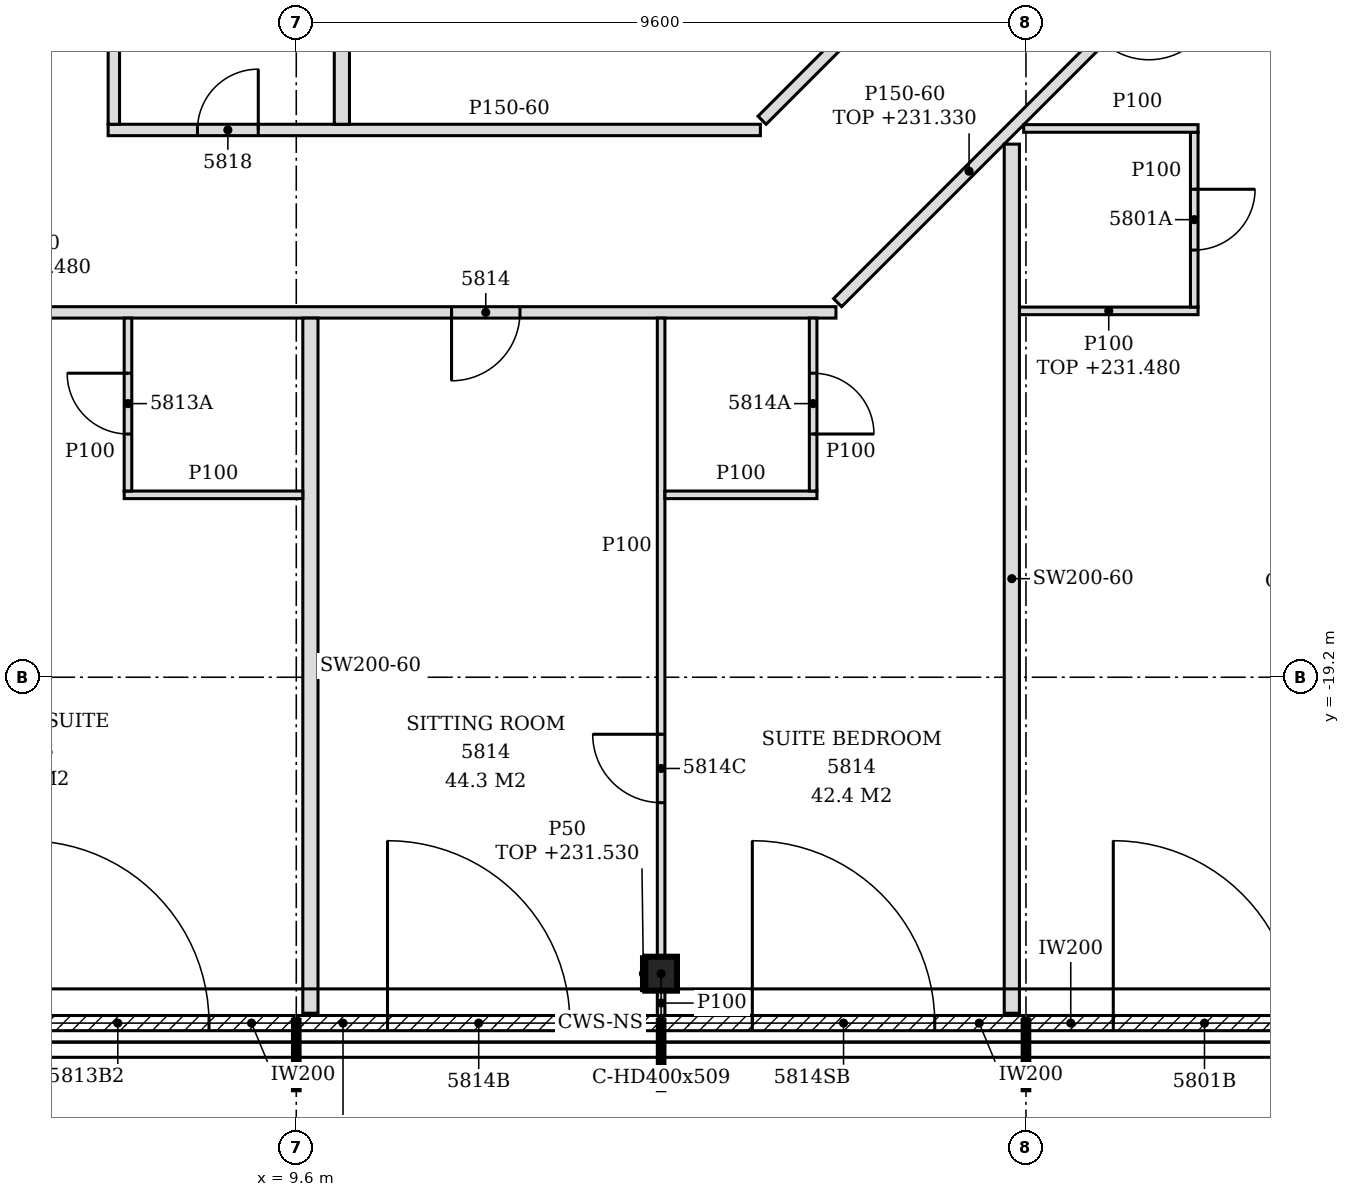
"""IFC4 building model, lengths in metres.
Left out: names, types, materials, properties, quantities, classifications, styles, units other than length and angle.
Written with IfcOpenShell. Run it as: python <this file> out.ifc"""

import sys

from ifc_helpers import new_model, si_unit, direction, frame, frame_2d, origin, origin_2d, place, context, subcontext, project, spatial, polyline, rectangle, i_section, outline, extrude, element, fill, save


model = new_model("IFC4")
c1 = context("Model", 3, precision=1e-05, world=origin(), true_north=direction((0.0, 1.0)))
c2 = subcontext(c1, "Body", "Model", "MODEL_VIEW")
j1 = project(units=[si_unit("LENGTHUNIT", "METRE"), si_unit("PLANEANGLEUNIT", "RADIAN")], contexts=[c1])
p1 = place(None, origin())
s1 = spatial("IfcSite", under=j1, at=p1, CompositionType="ELEMENT")
p2 = place(p1, origin())
s2 = spatial("IfcBuilding", under=s1, at=p2, CompositionType="ELEMENT")
p3 = place(p2, frame((0.0, 0.0, 228.6)))
s3 = spatial("IfcBuildingStorey", under=s2, at=p3, CompositionType="ELEMENT", Elevation=228.6)
p4 = place(p3, frame((14.4, -23.1, -0.15), z_axis=(0.0, 0.0, 1.0), x_axis=(1.0, 0.0, 0.0)))
e1 = element("IfcColumn", 1, at=p4, inside=s3, PredefinedType="COLUMN", context=c2, shape_type="SweptSolid", body=[
    extrude(i_section(OverallWidth=0.416, OverallDepth=0.446, WebThickness=0.039, FlangeThickness=0.063, FilletRadius=0.015, at=origin_2d()), origin(), (0.0, 0.0, 1.0), 3.6),
])
p5 = place(p3, frame((4.944, -23.75, 0.0), z_axis=(0.0, 0.0, 1.0), x_axis=(1.0, 0.0, 0.0)))
e2 = element("IfcWall", 2, at=p5, inside=s3, PredefinedType="NOTDEFINED", context=c2, shape_type="SweptSolid", body=[
    extrude(rectangle(XDim=4.626, YDim=0.2, at=frame_2d((2.313, 0.0))), origin(), (0.0, 0.0, 1.0), 3.45),
])
p6 = place(p5, frame((1.108, 0.0, 0.0)))
e3 = element("IfcOpeningElement", 3, at=p6, cuts=e2, PredefinedType="OPENING", context=c2, shape_type="SweptSolid", body=[
    extrude(rectangle(XDim=2.4, YDim=2.4, at=frame_2d((1.2, 1.2))), frame((0.0, 0.11, 0.0), z_axis=(0.0, -1.0, 0.0), x_axis=(1.0, 0.0, 0.0)), (0.0, 0.0, 1.0), 0.22),
])
p7 = place(p3, frame((9.63, -23.75, 0.0), z_axis=(0.0, 0.0, 1.0), x_axis=(1.0, 0.0, 0.0)))
e4 = element("IfcWall", 4, at=p7, inside=s3, PredefinedType="NOTDEFINED", context=c2, shape_type="SweptSolid", body=[
    extrude(rectangle(XDim=4.74, YDim=0.2, at=frame_2d((2.37, 0.0))), origin(), (0.0, 0.0, 1.0), 3.45),
])
p8 = place(p7, frame((1.17, 0.0, 0.0)))
e5 = element("IfcOpeningElement", 5, at=p8, cuts=e4, PredefinedType="OPENING", context=c2, shape_type="SweptSolid", body=[
    extrude(rectangle(XDim=2.4, YDim=2.4, at=frame_2d((1.2, 1.2))), frame((0.0, 0.11, 0.0), z_axis=(0.0, -1.0, 0.0), x_axis=(1.0, 0.0, 0.0)), (0.0, 0.0, 1.0), 0.22),
])
p9 = place(p3, frame((14.43, -23.75, 0.0), z_axis=(0.0, 0.0, 1.0), x_axis=(1.0, 0.0, 0.0)))
e6 = element("IfcWall", 6, at=p9, inside=s3, PredefinedType="NOTDEFINED", context=c2, shape_type="SweptSolid", body=[
    extrude(rectangle(XDim=4.74, YDim=0.2, at=frame_2d((2.37, 0.0))), origin(), (0.0, 0.0, 1.0), 3.45),
])
p10 = place(p9, frame((1.17, 0.0, 0.0)))
e7 = element("IfcOpeningElement", 7, at=p10, cuts=e6, PredefinedType="OPENING", context=c2, shape_type="SweptSolid", body=[
    extrude(rectangle(XDim=2.4, YDim=2.4, at=frame_2d((1.2, 1.2))), frame((0.0, 0.11, 0.0), z_axis=(0.0, -1.0, 0.0), x_axis=(1.0, 0.0, 0.0)), (0.0, 0.0, 1.0), 0.22),
])
p11 = place(p3, frame((19.23, -23.75, 0.0), z_axis=(0.0, 0.0, 1.0), x_axis=(1.0, 0.0, 0.0)))
e8 = element("IfcWall", 8, at=p11, inside=s3, PredefinedType="NOTDEFINED", context=c2, shape_type="SweptSolid", body=[
    extrude(rectangle(XDim=4.626, YDim=0.2, at=frame_2d((2.313, 0.0))), origin(), (0.0, 0.0, 1.0), 3.45),
])
p12 = place(p11, frame((1.119, 0.0, 0.0)))
e9 = element("IfcOpeningElement", 9, at=p12, cuts=e8, PredefinedType="OPENING", context=c2, shape_type="SweptSolid", body=[
    extrude(rectangle(XDim=2.4, YDim=2.4, at=frame_2d((1.2, 1.2))), frame((0.0, 0.11, 0.0), z_axis=(0.0, -1.0, 0.0), x_axis=(1.0, 0.0, 0.0)), (0.0, 0.0, 1.0), 0.22),
])
p13 = place(p3, frame((14.4, -23.65, 0.0), z_axis=(0.0, 0.0, 1.0), x_axis=(0.0, 1.0, 0.0)))
e10 = element("IfcWall", 10, at=p13, inside=s3, PredefinedType="PARTITIONING", context=c2, shape_type="SweptSolid", body=[
    extrude(rectangle(XDim=0.327, YDim=0.1, at=frame_2d((0.164, 0.0))), origin(), (0.0, 0.0, 1.0), 3.45),
])
p14 = place(p3, frame((9.786, -23.62, 0.0), z_axis=(0.0, 0.0, 1.0), x_axis=(0.0, 1.0, 0.0)))
e11 = element("IfcWall", 11, at=p14, inside=s3, PredefinedType="PARTITIONING", context=c2, shape_type="SweptSolid", body=[
    extrude(outline(polyline([(0.0, 0.0), (9.145, 0.0), (9.145, 2.88), (9.115, 2.88), (9.113, 3.45), (4.525, 3.45), (4.523, 2.88), (4.315, 2.88), (4.313, 3.45), (0.67, 3.45), (0.668, 2.93), (0.37, 2.93), (0.368, 3.45), (0.0, 3.45), (0.0, 0.0)])), frame((0.0, 0.1, 0.0), z_axis=(0.0, -1.0, 0.0), x_axis=(1.0, 0.0, 0.0)), (0.0, 0.0, 1.0), 0.2),
])
p15 = place(p3, frame((19.014, -23.62, 0.0), z_axis=(0.0, 0.0, 1.0), x_axis=(0.0, 1.0, 0.0)))
e12 = element("IfcWall", 12, at=p15, inside=s3, PredefinedType="PARTITIONING", context=c2, shape_type="SweptSolid", body=[
    extrude(outline(polyline([(0.0, 0.0), (11.434, 0.0), (11.434, 2.73), (0.64, 2.73), (0.638, 2.93), (0.37, 2.93), (0.368, 3.45), (0.0, 3.45), (0.0, 0.0)])), frame((0.0, 0.1, 0.0), z_axis=(0.0, -1.0, 0.0), x_axis=(1.0, 0.0, 0.0)), (0.0, 0.0, 1.0), 0.2),
])
p16 = place(p3, frame((14.4, -22.877, 0.0), z_axis=(0.0, 0.0, 1.0), x_axis=(0.0, 1.0, 0.0)))
e13 = element("IfcWall", 13, at=p16, inside=s3, PredefinedType="PARTITIONING", context=c2, shape_type="SweptSolid", body=[
    extrude(outline(polyline([(0.0, 0.0), (8.402, 0.0), (8.402, 2.88), (8.372, 2.88), (8.37, 3.45), (3.782, 3.45), (3.78, 2.88), (3.572, 2.88), (3.57, 3.45), (0.0, 3.45), (0.0, 0.0)])), frame((0.0, 0.05, 0.0), z_axis=(0.0, -1.0, 0.0), x_axis=(1.0, 0.0, 0.0)), (0.0, 0.0, 1.0), 0.1),
])
p17 = place(p16, frame((2.027, 0.0, 0.0)))
e14 = element("IfcOpeningElement", 14, at=p17, cuts=e13, PredefinedType="OPENING", context=c2, shape_type="SweptSolid", body=[
    extrude(rectangle(XDim=0.9, YDim=2.1, at=frame_2d((0.45, 1.05))), frame((0.0, 0.06, 0.0), z_axis=(0.0, -1.0, 0.0), x_axis=(1.0, 0.0, 0.0)), (0.0, 0.0, 1.0), 0.12),
])
p18 = place(p3, frame((7.336, -16.8, 0.0), z_axis=(0.0, 0.0, 1.0), x_axis=(1.0, 0.0, 0.0)))
e15 = element("IfcWall", 15, at=p18, inside=s3, PredefinedType="PARTITIONING", context=c2, shape_type="SweptSolid", body=[
    extrude(outline(polyline([(0.0, 0.0), (2.35, 0.0), (2.35, 3.45), (0.014, 3.45), (0.012, 2.73), (0.0, 2.73), (0.0, 0.0)])), frame((0.0, 0.05, 0.0), z_axis=(0.0, -1.0, 0.0), x_axis=(1.0, 0.0, 0.0)), (0.0, 0.0, 1.0), 0.1),
])
p19 = place(p3, frame((7.386, -16.75, 0.0), z_axis=(0.0, 0.0, 1.0), x_axis=(0.0, 1.0, 0.0)))
e16 = element("IfcWall", 16, at=p19, inside=s3, PredefinedType="PARTITIONING", context=c2, shape_type="SweptSolid", body=[
    extrude(outline(polyline([(0.0, 0.0), (2.275, 0.0), (2.275, 2.88), (2.245, 2.88), (2.243, 3.45), (0.0, 3.45), (0.0, 0.0)])), frame((0.0, 0.05, 0.0), z_axis=(0.0, -1.0, 0.0), x_axis=(1.0, 0.0, 0.0)), (0.0, 0.0, 1.0), 0.1),
])
p20 = place(p19, frame((0.75, 0.0, 0.0)))
e17 = element("IfcOpeningElement", 17, at=p20, cuts=e16, PredefinedType="OPENING", context=c2, shape_type="SweptSolid", body=[
    extrude(rectangle(XDim=0.8, YDim=2.1, at=frame_2d((0.4, 1.05))), frame((0.0, 0.06, 0.0), z_axis=(0.0, -1.0, 0.0), x_axis=(1.0, 0.0, 0.0)), (0.0, 0.0, 1.0), 0.12),
])
p21 = place(p3, frame((14.45, -16.8, 0.0), z_axis=(0.0, 0.0, 1.0), x_axis=(1.0, 0.0, 0.0)))
e18 = element("IfcWall", 18, at=p21, inside=s3, PredefinedType="PARTITIONING", context=c2, shape_type="SweptSolid", body=[
    extrude(rectangle(XDim=2.0, YDim=0.1, at=frame_2d((1.0, 0.0))), origin(), (0.0, 0.0, 1.0), 3.45),
])
p22 = place(p3, frame((16.4, -16.75, 0.0), z_axis=(0.0, 0.0, 1.0), x_axis=(0.0, 1.0, 0.0)))
e19 = element("IfcWall", 19, at=p22, inside=s3, PredefinedType="PARTITIONING", context=c2, shape_type="SweptSolid", body=[
    extrude(outline(polyline([(0.0, 0.0), (2.275, 0.0), (2.275, 2.88), (2.245, 2.88), (2.243, 3.45), (0.0, 3.45), (0.0, 0.0)])), frame((0.0, 0.05, 0.0), z_axis=(0.0, -1.0, 0.0), x_axis=(1.0, 0.0, 0.0)), (0.0, 0.0, 1.0), 0.1),
])
p23 = place(p22, frame((0.75, 0.0, 0.0)))
e20 = element("IfcOpeningElement", 20, at=p23, cuts=e19, PredefinedType="OPENING", context=c2, shape_type="SweptSolid", body=[
    extrude(rectangle(XDim=0.8, YDim=2.1, at=frame_2d((0.4, 1.05))), frame((0.0, 0.06, 0.0), z_axis=(0.0, -1.0, 0.0), x_axis=(1.0, 0.0, 0.0)), (0.0, 0.0, 1.0), 0.12),
])
p24 = place(p3, frame((29.636, -16.66, 0.0), z_axis=(0.0, 0.0, 1.0), x_axis=(-0.707095420673, 0.707118141518, 0.0)))
e21 = element("IfcWall", 21, at=p24, inside=s3, PredefinedType="PARTITIONING", context=c2, shape_type="SweptSolid", body=[
    extrude(rectangle(XDim=10.745, YDim=0.2, at=frame_2d((5.373, 0.0))), origin(), (0.0, 0.0, 1.0), 2.88),
])
p25 = place(p3, frame((-4.326, -14.4, 0.0), z_axis=(0.0, 0.0, 1.0), x_axis=(1.0, 0.0, 0.0)))
e22 = element("IfcWall", 22, at=p25, inside=s3, PredefinedType="PARTITIONING", context=c2, shape_type="SweptSolid", body=[
    extrude(outline(polyline([(0.0, 0.0), (21.026, 0.0), (21.026, 2.88), (11.676, 2.88), (11.674, 2.73), (11.376, 2.73), (11.374, 2.88), (1.369, 2.88), (1.367, 2.63), (0.229, 2.63), (0.227, 2.88), (0.0, 2.88), (0.0, 0.0)])), frame((0.0, 0.075, 0.0), z_axis=(0.0, -1.0, 0.0), x_axis=(1.0, 0.0, 0.0)), (0.0, 0.0, 1.0), 0.15),
])
p26 = place(p25, frame((5.169, 0.0, 0.0)))
e23 = element("IfcOpeningElement", 23, at=p26, cuts=e22, PredefinedType="OPENING", context=c2, shape_type="SweptSolid", body=[
    extrude(rectangle(XDim=0.9, YDim=2.1, at=frame_2d((0.45, 1.05))), frame((0.0, 0.085, 0.0), z_axis=(0.0, -1.0, 0.0), x_axis=(1.0, 0.0, 0.0)), (0.0, 0.0, 1.0), 0.17),
])
p27 = place(p25, frame((15.969, 0.0, 0.0)))
e24 = element("IfcOpeningElement", 24, at=p27, cuts=e22, PredefinedType="OPENING", context=c2, shape_type="SweptSolid", body=[
    extrude(rectangle(XDim=0.9, YDim=2.1, at=frame_2d((0.45, 1.05))), frame((0.0, 0.085, 0.0), z_axis=(0.0, -1.0, 0.0), x_axis=(1.0, 0.0, 0.0)), (0.0, 0.0, 1.0), 0.17),
])
p28 = place(p3, frame((19.114, -14.38, 0.0), z_axis=(0.0, 0.0, 1.0), x_axis=(1.0, 0.0, 0.0)))
e25 = element("IfcWall", 25, at=p28, inside=s3, PredefinedType="PARTITIONING", context=c2, shape_type="SweptSolid", body=[
    extrude(outline(polyline([(0.0, 0.0), (2.35, 0.0), (2.35, 2.88), (0.236, 2.88), (0.234, 2.73), (0.0, 2.73), (0.0, 0.0)])), frame((0.0, 0.05, 0.0), z_axis=(0.0, -1.0, 0.0), x_axis=(1.0, 0.0, 0.0)), (0.0, 0.0, 1.0), 0.1),
])
p29 = place(p3, frame((16.722, -14.272, 0.0), z_axis=(0.0, 0.0, 1.0), x_axis=(0.707106781187, 0.707106781187, 0.0)))
e26 = element("IfcWall", 26, at=p29, inside=s3, PredefinedType="PARTITIONING", context=c2, shape_type="SweptSolid", body=[
    extrude(rectangle(XDim=20.049, YDim=0.15, at=frame_2d((10.025, 0.0))), origin(), (0.0, 0.0, 1.0), 2.73),
])
p30 = place(p29, frame((4.892, 0.0, 0.0)))
e27 = element("IfcOpeningElement", 27, at=p30, cuts=e26, PredefinedType="OPENING", context=c2, shape_type="SweptSolid", body=[
    extrude(rectangle(XDim=0.9, YDim=2.1, at=frame_2d((0.45, 1.05))), frame((0.0, 0.085, 0.0), z_axis=(0.0, -1.0, 0.0), x_axis=(1.0, 0.0, 0.0)), (0.0, 0.0, 1.0), 0.17),
])
p31 = place(p29, frame((10.042, 0.0, 0.0)))
e28 = element("IfcOpeningElement", 28, at=p31, cuts=e26, PredefinedType="OPENING", context=c2, shape_type="SweptSolid", body=[
    extrude(rectangle(XDim=0.9, YDim=2.1, at=frame_2d((0.45, 1.05))), frame((0.0, 0.085, 0.0), z_axis=(0.0, -1.0, 0.0), x_axis=(1.0, 0.0, 0.0)), (0.0, 0.0, 1.0), 0.17),
])
p32 = place(p29, frame((14.443, 0.0, 0.0)))
e29 = element("IfcOpeningElement", 29, at=p32, cuts=e26, PredefinedType="OPENING", context=c2, shape_type="SweptSolid", body=[
    extrude(rectangle(XDim=0.9, YDim=2.1, at=frame_2d((0.45, 1.05))), frame((0.0, 0.085, 0.0), z_axis=(0.0, -1.0, 0.0), x_axis=(1.0, 0.0, 0.0)), (0.0, 0.0, 1.0), 0.17),
])
p33 = place(p29, frame((17.837, 0.0, 0.0)))
e30 = element("IfcOpeningElement", 30, at=p33, cuts=e26, PredefinedType="OPENING", context=c2, shape_type="SweptSolid", body=[
    extrude(rectangle(XDim=0.9, YDim=2.1, at=frame_2d((0.45, 1.05))), frame((0.0, 0.085, 0.0), z_axis=(0.0, -1.0, 0.0), x_axis=(1.0, 0.0, 0.0)), (0.0, 0.0, 1.0), 0.17),
])
p34 = place(p3, frame((21.414, -14.33, 0.0), z_axis=(0.0, 0.0, 1.0), x_axis=(0.0, 1.0, 0.0)))
e31 = element("IfcWall", 31, at=p34, inside=s3, PredefinedType="PARTITIONING", context=c2, shape_type="SweptSolid", body=[
    extrude(outline(polyline([(0.0, 0.0), (2.3, 0.0), (2.3, 3.45), (0.035, 3.45), (0.033, 2.88), (0.0, 2.88), (0.0, 0.0)])), frame((0.0, 0.05, 0.0), z_axis=(0.0, -1.0, 0.0), x_axis=(1.0, 0.0, 0.0)), (0.0, 0.0, 1.0), 0.1),
])
p35 = place(p34, frame((0.75, 0.0, 0.0)))
e32 = element("IfcOpeningElement", 32, at=p35, cuts=e31, PredefinedType="OPENING", context=c2, shape_type="SweptSolid", body=[
    extrude(rectangle(XDim=0.8, YDim=2.1, at=frame_2d((0.4, 1.05))), frame((0.0, 0.06, 0.0), z_axis=(0.0, -1.0, 0.0), x_axis=(1.0, 0.0, 0.0)), (0.0, 0.0, 1.0), 0.12),
])
p36 = place(p3, frame((7.125, -12.0, 0.0), z_axis=(0.0, 0.0, 1.0), x_axis=(1.0, 0.0, 0.0)))
e33 = element("IfcWall", 33, at=p36, inside=s3, PredefinedType="PARTITIONING", context=c2, shape_type="SweptSolid", body=[
    extrude(outline(polyline([(0.0, 0.0), (8.581, 0.0), (8.581, 3.45), (0.225, 3.45), (0.223, 2.73), (0.0, 2.73), (0.0, 0.0)])), frame((0.0, 0.075, 0.0), z_axis=(0.0, -1.0, 0.0), x_axis=(1.0, 0.0, 0.0)), (0.0, 0.0, 1.0), 0.15),
])
p37 = place(p36, frame((1.175, 0.0, 0.0)))
e34 = element("IfcOpeningElement", 34, at=p37, cuts=e33, PredefinedType="OPENING", context=c2, shape_type="SweptSolid", body=[
    extrude(rectangle(XDim=0.8, YDim=2.1, at=frame_2d((0.4, 1.05))), frame((0.0, 0.085, 0.0), z_axis=(0.0, -1.0, 0.0), x_axis=(1.0, 0.0, 0.0)), (0.0, 0.0, 1.0), 0.17),
])
p38 = place(p3, frame((19.17, -11.98, 0.0), z_axis=(0.0, 0.0, 1.0), x_axis=(1.0, 0.0, 0.0)))
e35 = element("IfcWall", 35, at=p38, inside=s3, PredefinedType="PARTITIONING", context=c2, shape_type="SweptSolid", body=[
    extrude(outline(polyline([(0.0, 0.0), (2.294, 0.0), (2.294, 3.45), (0.18, 3.45), (0.178, 2.73), (0.0, 2.73), (0.0, 0.0)])), frame((0.0, 0.05, 0.0), z_axis=(0.0, -1.0, 0.0), x_axis=(1.0, 0.0, 0.0)), (0.0, 0.0, 1.0), 0.1),
])
p39 = place(p3, frame((7.2, -11.925, 0.0), z_axis=(0.0, 0.0, 1.0), x_axis=(0.0, 1.0, 0.0)))
e36 = element("IfcWall", 36, at=p39, inside=s3, PredefinedType="PARTITIONING", context=c2, shape_type="SweptSolid", body=[
    extrude(rectangle(XDim=3.329, YDim=0.15, at=frame_2d((1.664, 0.0))), origin(), (0.0, 0.0, 1.0), 2.73),
])
p40 = place(p3, frame((10.2, -11.925, 0.0), z_axis=(0.0, 0.0, 1.0), x_axis=(0.0, 1.0, 0.0)))
e37 = element("IfcWall", 37, at=p40, inside=s3, PredefinedType="PARTITIONING", context=c2, shape_type="SweptSolid", body=[
    extrude(rectangle(XDim=2.225, YDim=0.2, at=frame_2d((1.113, 0.0))), origin(), (0.0, 0.0, 1.0), 3.45),
])
p41 = place(p3, frame((15.728, -11.872, 0.0), z_axis=(0.0, 0.0, 1.0), x_axis=(0.707080416772, 0.707133144618, 0.0)))
e38 = element("IfcWall", 38, at=p41, inside=s3, PredefinedType="PARTITIONING", context=c2, shape_type="SweptSolid", body=[
    extrude(rectangle(XDim=4.63, YDim=0.15, at=frame_2d((2.315, 0.0))), origin(), (0.0, 0.0, 1.0), 3.45),
])
p42 = place(p3, frame((14.167, -23.323, 0.0), z_axis=(0.0, 0.0, 1.0), x_axis=(0.0, 1.0, 0.0)))
e39 = element("IfcWall", 39, at=p42, inside=s3, PredefinedType="PARTITIONING", context=c2, shape_type="SweptSolid", body=[
    extrude(rectangle(XDim=0.446, YDim=0.05, at=frame_2d((0.223, 0.0))), origin(), (0.0, 0.0, 1.0), 2.93),
])
p43 = place(p6, origin())
e40 = element("IfcDoor", 40, at=p43, inside=s3, OperationType="SINGLE_SWING_LEFT", PredefinedType="DOOR", context=c2, shape_type="SweptSolid", body=[
    extrude(rectangle(XDim=2.4, YDim=2.4, at=frame_2d((1.2, 1.2))), frame((0.0, 0.025, 0.0), z_axis=(0.0, -1.0, 0.0), x_axis=(1.0, 0.0, 0.0)), (0.0, 0.0, 1.0), 0.05),
])
fill(e3, e40)
p44 = place(p8, origin())
e41 = element("IfcDoor", 41, at=p44, inside=s3, OperationType="SINGLE_SWING_LEFT", PredefinedType="DOOR", context=c2, shape_type="SweptSolid", body=[
    extrude(rectangle(XDim=2.4, YDim=2.4, at=frame_2d((1.2, 1.2))), frame((0.0, 0.025, 0.0), z_axis=(0.0, -1.0, 0.0), x_axis=(1.0, 0.0, 0.0)), (0.0, 0.0, 1.0), 0.05),
])
fill(e5, e41)
p45 = place(p10, origin())
e42 = element("IfcDoor", 42, at=p45, inside=s3, OperationType="SINGLE_SWING_LEFT", PredefinedType="DOOR", context=c2, shape_type="SweptSolid", body=[
    extrude(rectangle(XDim=2.4, YDim=2.4, at=frame_2d((1.2, 1.2))), frame((0.0, 0.025, 0.0), z_axis=(0.0, -1.0, 0.0), x_axis=(1.0, 0.0, 0.0)), (0.0, 0.0, 1.0), 0.05),
])
fill(e7, e42)
p46 = place(p12, origin())
e43 = element("IfcDoor", 43, at=p46, inside=s3, OperationType="SINGLE_SWING_LEFT", PredefinedType="DOOR", context=c2, shape_type="SweptSolid", body=[
    extrude(rectangle(XDim=2.4, YDim=2.4, at=frame_2d((1.2, 1.2))), frame((0.0, 0.025, 0.0), z_axis=(0.0, -1.0, 0.0), x_axis=(1.0, 0.0, 0.0)), (0.0, 0.0, 1.0), 0.05),
])
fill(e9, e43)
p47 = place(p35, frame((0.8, 0.0, 0.0), z_axis=(0.0, 0.0, 1.0), x_axis=(-1.0, 0.0, 0.0)))
e44 = element("IfcDoor", 44, at=p47, inside=s3, OperationType="SINGLE_SWING_LEFT", PredefinedType="DOOR", context=c2, shape_type="SweptSolid", body=[
    extrude(rectangle(XDim=0.8, YDim=2.1, at=frame_2d((0.4, 1.05))), frame((0.0, 0.025, 0.0), z_axis=(0.0, -1.0, 0.0), x_axis=(1.0, 0.0, 0.0)), (0.0, 0.0, 1.0), 0.05),
])
fill(e32, e44)
p48 = place(p20, origin())
e45 = element("IfcDoor", 45, at=p48, inside=s3, OperationType="SINGLE_SWING_RIGHT", PredefinedType="DOOR", context=c2, shape_type="SweptSolid", body=[
    extrude(rectangle(XDim=0.8, YDim=2.1, at=frame_2d((0.4, 1.05))), frame((0.0, 0.025, 0.0), z_axis=(0.0, -1.0, 0.0), x_axis=(1.0, 0.0, 0.0)), (0.0, 0.0, 1.0), 0.05),
])
fill(e17, e45)
p49 = place(p27, frame((0.9, 0.0, 0.0), z_axis=(0.0, 0.0, 1.0), x_axis=(-1.0, 0.0, 0.0)))
e46 = element("IfcDoor", 46, at=p49, inside=s3, OperationType="SINGLE_SWING_RIGHT", PredefinedType="DOOR", context=c2, shape_type="SweptSolid", body=[
    extrude(rectangle(XDim=0.9, YDim=2.1, at=frame_2d((0.45, 1.05))), frame((0.0, 0.025, 0.0), z_axis=(0.0, -1.0, 0.0), x_axis=(1.0, 0.0, 0.0)), (0.0, 0.0, 1.0), 0.05),
])
fill(e24, e46)
p50 = place(p17, origin())
e47 = element("IfcDoor", 47, at=p50, inside=s3, OperationType="SINGLE_SWING_RIGHT", PredefinedType="DOOR", context=c2, shape_type="SweptSolid", body=[
    extrude(rectangle(XDim=0.9, YDim=2.1, at=frame_2d((0.45, 1.05))), frame((0.0, 0.025, 0.0), z_axis=(0.0, -1.0, 0.0), x_axis=(1.0, 0.0, 0.0)), (0.0, 0.0, 1.0), 0.05),
])
fill(e14, e47)
p51 = place(p23, frame((0.8, 0.0, 0.0), z_axis=(0.0, 0.0, 1.0), x_axis=(-1.0, 0.0, 0.0)))
e48 = element("IfcDoor", 48, at=p51, inside=s3, OperationType="SINGLE_SWING_RIGHT", PredefinedType="DOOR", context=c2, shape_type="SweptSolid", body=[
    extrude(rectangle(XDim=0.8, YDim=2.1, at=frame_2d((0.4, 1.05))), frame((0.0, 0.025, 0.0), z_axis=(0.0, -1.0, 0.0), x_axis=(1.0, 0.0, 0.0)), (0.0, 0.0, 1.0), 0.05),
])
fill(e20, e48)
p52 = place(p37, origin())
e49 = element("IfcDoor", 49, at=p52, inside=s3, OperationType="SINGLE_SWING_RIGHT", PredefinedType="DOOR", context=c2, shape_type="SweptSolid", body=[
    extrude(rectangle(XDim=0.8, YDim=2.1, at=frame_2d((0.4, 1.05))), frame((0.0, 0.025, 0.0), z_axis=(0.0, -1.0, 0.0), x_axis=(1.0, 0.0, 0.0)), (0.0, 0.0, 1.0), 0.05),
])
fill(e34, e49)
save(model, sys.argv[1])
